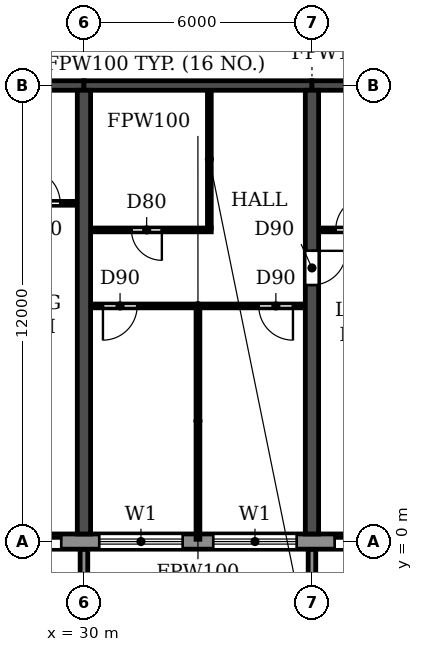
"""IFC4 building model, lengths in metres.
Left out: names, types, materials, properties, quantities, classifications, styles, units other than length and angle.
Written with IfcOpenShell. Run it as: python <this file> out.ifc"""

import sys

from ifc_helpers import new_model, si_unit, direction, frame, frame_2d, origin, place, context, subcontext, project, spatial, polyline, rectangle, outline, extrude, source, transform, mapped, element, fill, save


model = new_model("IFC4")
c1 = context("Model", 3, precision=1e-05, world=origin(), true_north=direction((0.0, 1.0)))
c2 = subcontext(c1, "Body", "Model", "MODEL_VIEW")
j1 = project(units=[si_unit("LENGTHUNIT", "METRE"), si_unit("PLANEANGLEUNIT", "RADIAN")], contexts=[c1])
p1 = place(None, origin())
s1 = spatial("IfcSite", under=j1, at=p1, CompositionType="ELEMENT")
p2 = place(p1, origin())
s2 = spatial("IfcBuilding", under=s1, at=p2, CompositionType="ELEMENT")
p3 = place(p2, frame((0.0, 0.0, 76.2)))
s3 = spatial("IfcBuildingStorey", under=s2, at=p3, CompositionType="ELEMENT", Elevation=76.2)
p4 = place(p3, frame((30.0, 0.2, 0.0), z_axis=(0.0, 0.0, 1.0), x_axis=(0.0, 1.0, 0.0)))
e1 = element("IfcWall", 1, at=p4, inside=s3, PredefinedType="SHEAR", context=c2, shape_type="SweptSolid", body=[
    extrude(rectangle(XDim=11.675, YDim=0.35, at=frame_2d((5.837, 0.0))), origin(), (0.0, 0.0, 1.0), 3.06),
])
p5 = place(p3, frame((36.0, 0.2, 0.0), z_axis=(0.0, 0.0, 1.0), x_axis=(0.0, 1.0, 0.0)))
e2 = element("IfcWall", 2, at=p5, inside=s3, PredefinedType="SHEAR", context=c2, shape_type="SweptSolid", body=[
    extrude(rectangle(XDim=11.675, YDim=0.35, at=frame_2d((5.837, 0.0))), origin(), (0.0, 0.0, 1.0), 3.06),
])
p6 = place(p5, frame((6.55, 0.0, 0.0)))
e3 = element("IfcOpeningElement", 3, at=p6, cuts=e2, PredefinedType="OPENING", context=c2, shape_type="SweptSolid", body=[
    extrude(rectangle(XDim=0.9, YDim=2.1, at=frame_2d((0.45, 1.05))), frame((0.0, 0.185, 0.0), z_axis=(0.0, -1.0, 0.0), x_axis=(1.0, 0.0, 0.0)), (0.0, 0.0, 1.0), 0.37),
])
p7 = place(p3, frame((24.0, 12.0, 0.0), z_axis=(0.0, 0.0, 1.0), x_axis=(1.0, 0.0, 0.0)))
e4 = element("IfcWall", 4, at=p7, inside=s3, PredefinedType="SHEAR", context=c2, shape_type="SweptSolid", body=[
    extrude(rectangle(XDim=6.0, YDim=0.25, at=frame_2d((3.0, 0.0))), origin(), (0.0, 0.0, 1.0), 2.46),
])
p8 = place(p7, frame((2.45, 0.0, 0.0)))
e5 = element("IfcOpeningElement", 5, at=p8, cuts=e4, PredefinedType="OPENING", context=c2, shape_type="SweptSolid", body=[
    extrude(rectangle(XDim=1.0, YDim=2.1, at=frame_2d((0.5, 1.05))), frame((0.0, 0.135, 0.0), z_axis=(0.0, -1.0, 0.0), x_axis=(1.0, 0.0, 0.0)), (0.0, 0.0, 1.0), 0.27),
])
p9 = place(p3, frame((30.0, 12.0, 0.0), z_axis=(0.0, 0.0, 1.0), x_axis=(1.0, 0.0, 0.0)))
e6 = element("IfcWall", 6, at=p9, inside=s3, PredefinedType="SHEAR", context=c2, shape_type="SweptSolid", body=[
    extrude(rectangle(XDim=6.0, YDim=0.25, at=frame_2d((3.0, 0.0))), origin(), (0.0, 0.0, 1.0), 2.46),
])
p10 = place(p3, frame((36.0, 12.0, 0.0), z_axis=(0.0, 0.0, 1.0), x_axis=(1.0, 0.0, 0.0)))
e7 = element("IfcWall", 7, at=p10, inside=s3, PredefinedType="SHEAR", context=c2, shape_type="SweptSolid", body=[
    extrude(rectangle(XDim=6.0, YDim=0.25, at=frame_2d((3.0, 0.0))), origin(), (0.0, 0.0, 1.0), 2.46),
])
p11 = place(p10, frame((2.55, 0.0, 0.0)))
e8 = element("IfcOpeningElement", 8, at=p11, cuts=e7, PredefinedType="OPENING", context=c2, shape_type="SweptSolid", body=[
    extrude(rectangle(XDim=1.0, YDim=2.1, at=frame_2d((0.5, 1.05))), frame((0.0, 0.135, 0.0), z_axis=(0.0, -1.0, 0.0), x_axis=(1.0, 0.0, 0.0)), (0.0, 0.0, 1.0), 0.27),
])
p12 = place(p3, frame((10.683, 0.0, 0.0), z_axis=(0.0, 0.0, 1.0), x_axis=(1.0, 0.0, 0.0)))
e9 = element("IfcWall", 9, at=p12, inside=s3, PredefinedType="STANDARD", context=c2, shape_type="SweptSolid", body=[
    extrude(rectangle(XDim=80.634, YDim=0.4, at=frame_2d((40.317, 0.0))), origin(), (0.0, 0.0, 1.0), 3.06),
])
p13 = place(p12, frame((1.717, 0.0, 0.9)))
e10 = element("IfcOpeningElement", 10, at=p13, cuts=e9, PredefinedType="OPENING", context=c2, shape_type="SweptSolid", body=[
    extrude(rectangle(XDim=2.2, YDim=1.5, at=frame_2d((1.1, 0.75))), frame((0.0, 0.21, 0.0), z_axis=(0.0, -1.0, 0.0), x_axis=(1.0, 0.0, 0.0)), (0.0, 0.0, 1.0), 0.42),
])
p14 = place(p12, frame((4.917, 0.0, 0.0)))
e11 = element("IfcOpeningElement", 11, at=p14, cuts=e9, PredefinedType="OPENING", context=c2, shape_type="SweptSolid", body=[
    extrude(rectangle(XDim=1.8, YDim=2.4, at=frame_2d((0.9, 1.2))), frame((0.0, 0.21, 0.0), z_axis=(0.0, -1.0, 0.0), x_axis=(1.0, 0.0, 0.0)), (0.0, 0.0, 1.0), 0.42),
])
p15 = place(p12, frame((7.717, 0.0, 0.9)))
e12 = element("IfcOpeningElement", 12, at=p15, cuts=e9, PredefinedType="OPENING", context=c2, shape_type="SweptSolid", body=[
    extrude(rectangle(XDim=2.2, YDim=1.5, at=frame_2d((1.1, 0.75))), frame((0.0, 0.21, 0.0), z_axis=(0.0, -1.0, 0.0), x_axis=(1.0, 0.0, 0.0)), (0.0, 0.0, 1.0), 0.42),
])
p16 = place(p12, frame((10.717, 0.0, 0.9)))
e13 = element("IfcOpeningElement", 13, at=p16, cuts=e9, PredefinedType="OPENING", context=c2, shape_type="SweptSolid", body=[
    extrude(rectangle(XDim=2.2, YDim=1.5, at=frame_2d((1.1, 0.75))), frame((0.0, 0.21, 0.0), z_axis=(0.0, -1.0, 0.0), x_axis=(1.0, 0.0, 0.0)), (0.0, 0.0, 1.0), 0.42),
])
p17 = place(p12, frame((13.717, 0.0, 0.9)))
e14 = element("IfcOpeningElement", 14, at=p17, cuts=e9, PredefinedType="OPENING", context=c2, shape_type="SweptSolid", body=[
    extrude(rectangle(XDim=2.2, YDim=1.5, at=frame_2d((1.1, 0.75))), frame((0.0, 0.21, 0.0), z_axis=(0.0, -1.0, 0.0), x_axis=(1.0, 0.0, 0.0)), (0.0, 0.0, 1.0), 0.42),
])
p18 = place(p12, frame((16.917, 0.0, 0.0)))
e15 = element("IfcOpeningElement", 15, at=p18, cuts=e9, PredefinedType="OPENING", context=c2, shape_type="SweptSolid", body=[
    extrude(rectangle(XDim=1.8, YDim=2.4, at=frame_2d((0.9, 1.2))), frame((0.0, 0.21, 0.0), z_axis=(0.0, -1.0, 0.0), x_axis=(1.0, 0.0, 0.0)), (0.0, 0.0, 1.0), 0.42),
])
p19 = place(p12, frame((19.717, 0.0, 0.9)))
e16 = element("IfcOpeningElement", 16, at=p19, cuts=e9, PredefinedType="OPENING", context=c2, shape_type="SweptSolid", body=[
    extrude(rectangle(XDim=2.2, YDim=1.5, at=frame_2d((1.1, 0.75))), frame((0.0, 0.21, 0.0), z_axis=(0.0, -1.0, 0.0), x_axis=(1.0, 0.0, 0.0)), (0.0, 0.0, 1.0), 0.42),
])
p20 = place(p12, frame((22.717, 0.0, 0.9)))
e17 = element("IfcOpeningElement", 17, at=p20, cuts=e9, PredefinedType="OPENING", context=c2, shape_type="SweptSolid", body=[
    extrude(rectangle(XDim=2.2, YDim=1.5, at=frame_2d((1.1, 0.75))), frame((0.0, 0.21, 0.0), z_axis=(0.0, -1.0, 0.0), x_axis=(1.0, 0.0, 0.0)), (0.0, 0.0, 1.0), 0.42),
])
p21 = place(p12, frame((25.917, 0.0, 0.0)))
e18 = element("IfcOpeningElement", 18, at=p21, cuts=e9, PredefinedType="OPENING", context=c2, shape_type="SweptSolid", body=[
    extrude(rectangle(XDim=1.8, YDim=2.4, at=frame_2d((0.9, 1.2))), frame((0.0, 0.21, 0.0), z_axis=(0.0, -1.0, 0.0), x_axis=(1.0, 0.0, 0.0)), (0.0, 0.0, 1.0), 0.42),
])
p22 = place(p12, frame((28.717, 0.0, 0.9)))
e19 = element("IfcOpeningElement", 19, at=p22, cuts=e9, PredefinedType="OPENING", context=c2, shape_type="SweptSolid", body=[
    extrude(rectangle(XDim=2.2, YDim=1.5, at=frame_2d((1.1, 0.75))), frame((0.0, 0.21, 0.0), z_axis=(0.0, -1.0, 0.0), x_axis=(1.0, 0.0, 0.0)), (0.0, 0.0, 1.0), 0.42),
])
p23 = place(p12, frame((31.717, 0.0, 0.9)))
e20 = element("IfcOpeningElement", 20, at=p23, cuts=e9, PredefinedType="OPENING", context=c2, shape_type="SweptSolid", body=[
    extrude(rectangle(XDim=2.2, YDim=1.5, at=frame_2d((1.1, 0.75))), frame((0.0, 0.21, 0.0), z_axis=(0.0, -1.0, 0.0), x_axis=(1.0, 0.0, 0.0)), (0.0, 0.0, 1.0), 0.42),
])
p24 = place(p12, frame((34.717, 0.0, 0.9)))
e21 = element("IfcOpeningElement", 21, at=p24, cuts=e9, PredefinedType="OPENING", context=c2, shape_type="SweptSolid", body=[
    extrude(rectangle(XDim=2.2, YDim=1.5, at=frame_2d((1.1, 0.75))), frame((0.0, 0.21, 0.0), z_axis=(0.0, -1.0, 0.0), x_axis=(1.0, 0.0, 0.0)), (0.0, 0.0, 1.0), 0.42),
])
p25 = place(p12, frame((37.917, 0.0, 0.0)))
e22 = element("IfcOpeningElement", 22, at=p25, cuts=e9, PredefinedType="OPENING", context=c2, shape_type="SweptSolid", body=[
    extrude(rectangle(XDim=1.8, YDim=2.4, at=frame_2d((0.9, 1.2))), frame((0.0, 0.21, 0.0), z_axis=(0.0, -1.0, 0.0), x_axis=(1.0, 0.0, 0.0)), (0.0, 0.0, 1.0), 0.42),
])
p26 = place(p12, frame((40.717, 0.0, 0.9)))
e23 = element("IfcOpeningElement", 23, at=p26, cuts=e9, PredefinedType="OPENING", context=c2, shape_type="SweptSolid", body=[
    extrude(rectangle(XDim=2.2, YDim=1.5, at=frame_2d((1.1, 0.75))), frame((0.0, 0.21, 0.0), z_axis=(0.0, -1.0, 0.0), x_axis=(1.0, 0.0, 0.0)), (0.0, 0.0, 1.0), 0.42),
])
p27 = place(p12, frame((43.717, 0.0, 0.9)))
e24 = element("IfcOpeningElement", 24, at=p27, cuts=e9, PredefinedType="OPENING", context=c2, shape_type="SweptSolid", body=[
    extrude(rectangle(XDim=2.2, YDim=1.5, at=frame_2d((1.1, 0.75))), frame((0.0, 0.21, 0.0), z_axis=(0.0, -1.0, 0.0), x_axis=(1.0, 0.0, 0.0)), (0.0, 0.0, 1.0), 0.42),
])
p28 = place(p12, frame((46.717, 0.0, 0.9)))
e25 = element("IfcOpeningElement", 25, at=p28, cuts=e9, PredefinedType="OPENING", context=c2, shape_type="SweptSolid", body=[
    extrude(rectangle(XDim=2.2, YDim=1.5, at=frame_2d((1.1, 0.75))), frame((0.0, 0.21, 0.0), z_axis=(0.0, -1.0, 0.0), x_axis=(1.0, 0.0, 0.0)), (0.0, 0.0, 1.0), 0.42),
])
p29 = place(p12, frame((49.917, 0.0, 0.0)))
e26 = element("IfcOpeningElement", 26, at=p29, cuts=e9, PredefinedType="OPENING", context=c2, shape_type="SweptSolid", body=[
    extrude(rectangle(XDim=1.8, YDim=2.4, at=frame_2d((0.9, 1.2))), frame((0.0, 0.21, 0.0), z_axis=(0.0, -1.0, 0.0), x_axis=(1.0, 0.0, 0.0)), (0.0, 0.0, 1.0), 0.42),
])
p30 = place(p12, frame((52.717, 0.0, 0.9)))
e27 = element("IfcOpeningElement", 27, at=p30, cuts=e9, PredefinedType="OPENING", context=c2, shape_type="SweptSolid", body=[
    extrude(rectangle(XDim=2.2, YDim=1.5, at=frame_2d((1.1, 0.75))), frame((0.0, 0.21, 0.0), z_axis=(0.0, -1.0, 0.0), x_axis=(1.0, 0.0, 0.0)), (0.0, 0.0, 1.0), 0.42),
])
p31 = place(p12, frame((55.717, 0.0, 0.9)))
e28 = element("IfcOpeningElement", 28, at=p31, cuts=e9, PredefinedType="OPENING", context=c2, shape_type="SweptSolid", body=[
    extrude(rectangle(XDim=2.2, YDim=1.5, at=frame_2d((1.1, 0.75))), frame((0.0, 0.21, 0.0), z_axis=(0.0, -1.0, 0.0), x_axis=(1.0, 0.0, 0.0)), (0.0, 0.0, 1.0), 0.42),
])
p32 = place(p12, frame((58.717, 0.0, 0.9)))
e29 = element("IfcOpeningElement", 29, at=p32, cuts=e9, PredefinedType="OPENING", context=c2, shape_type="SweptSolid", body=[
    extrude(rectangle(XDim=2.2, YDim=1.5, at=frame_2d((1.1, 0.75))), frame((0.0, 0.21, 0.0), z_axis=(0.0, -1.0, 0.0), x_axis=(1.0, 0.0, 0.0)), (0.0, 0.0, 1.0), 0.42),
])
p33 = place(p12, frame((61.717, 0.0, 0.9)))
e30 = element("IfcOpeningElement", 30, at=p33, cuts=e9, PredefinedType="OPENING", context=c2, shape_type="SweptSolid", body=[
    extrude(rectangle(XDim=2.2, YDim=1.5, at=frame_2d((1.1, 0.75))), frame((0.0, 0.21, 0.0), z_axis=(0.0, -1.0, 0.0), x_axis=(1.0, 0.0, 0.0)), (0.0, 0.0, 1.0), 0.42),
])
p34 = place(p12, frame((64.917, 0.0, 0.0)))
e31 = element("IfcOpeningElement", 31, at=p34, cuts=e9, PredefinedType="OPENING", context=c2, shape_type="SweptSolid", body=[
    extrude(rectangle(XDim=1.8, YDim=2.4, at=frame_2d((0.9, 1.2))), frame((0.0, 0.21, 0.0), z_axis=(0.0, -1.0, 0.0), x_axis=(1.0, 0.0, 0.0)), (0.0, 0.0, 1.0), 0.42),
])
p35 = place(p12, frame((67.717, 0.0, 0.9)))
e32 = element("IfcOpeningElement", 32, at=p35, cuts=e9, PredefinedType="OPENING", context=c2, shape_type="SweptSolid", body=[
    extrude(rectangle(XDim=2.2, YDim=1.5, at=frame_2d((1.1, 0.75))), frame((0.0, 0.21, 0.0), z_axis=(0.0, -1.0, 0.0), x_axis=(1.0, 0.0, 0.0)), (0.0, 0.0, 1.0), 0.42),
])
p36 = place(p12, frame((70.717, 0.0, 0.9)))
e33 = element("IfcOpeningElement", 33, at=p36, cuts=e9, PredefinedType="OPENING", context=c2, shape_type="SweptSolid", body=[
    extrude(rectangle(XDim=2.2, YDim=1.5, at=frame_2d((1.1, 0.75))), frame((0.0, 0.21, 0.0), z_axis=(0.0, -1.0, 0.0), x_axis=(1.0, 0.0, 0.0)), (0.0, 0.0, 1.0), 0.42),
])
p37 = place(p12, frame((73.917, 0.0, 0.0)))
e34 = element("IfcOpeningElement", 34, at=p37, cuts=e9, PredefinedType="OPENING", context=c2, shape_type="SweptSolid", body=[
    extrude(rectangle(XDim=1.8, YDim=2.4, at=frame_2d((0.9, 1.2))), frame((0.0, 0.21, 0.0), z_axis=(0.0, -1.0, 0.0), x_axis=(1.0, 0.0, 0.0)), (0.0, 0.0, 1.0), 0.42),
])
p38 = place(p12, frame((76.717, 0.0, 0.9)))
e35 = element("IfcOpeningElement", 35, at=p38, cuts=e9, PredefinedType="OPENING", context=c2, shape_type="SweptSolid", body=[
    extrude(rectangle(XDim=2.2, YDim=1.5, at=frame_2d((1.1, 0.75))), frame((0.0, 0.21, 0.0), z_axis=(0.0, -1.0, 0.0), x_axis=(1.0, 0.0, 0.0)), (0.0, 0.0, 1.0), 0.42),
])
m1 = source(origin(), c2, "Body", "SweptSolid", [
    extrude(outline(polyline([(0.0, 0.0), (0.2, 0.0), (0.2, 1.65), (0.0, 1.65), (0.0, 0.0)])), origin(), (0.0, 0.0, 1.0), 3.1),
])
for number, where in (
    (36, (29.9, -1.85, 0.0)),
    (37, (35.9, -1.85, 0.0)),
):
    element("IfcWall", number, at=place(p3, frame(where)), inside=s3, PredefinedType="STANDARD", context=c2, shape_type="MappedRepresentation", body=[
        mapped(m1, transform((0.0, 0.0, 0.0))),
    ])
p39 = place(p3, frame((30.185, 6.2, 0.0), z_axis=(0.0, 0.0, 1.0), x_axis=(1.0, 0.0, 0.0)))
e38 = element("IfcWall", 38, at=p39, inside=s3, PredefinedType="PARTITIONING", context=c2, shape_type="SweptSolid", body=[
    extrude(rectangle(XDim=5.63, YDim=0.1, at=frame_2d((2.815, 0.0))), origin(), (0.0, 0.0, 1.0), 3.06),
])
p40 = place(p39, frame((0.315, 0.0, 0.0)))
e39 = element("IfcOpeningElement", 39, at=p40, cuts=e38, PredefinedType="OPENING", context=c2, shape_type="SweptSolid", body=[
    extrude(rectangle(XDim=0.9, YDim=2.1, at=frame_2d((0.45, 1.05))), frame((0.0, 0.06, 0.0), z_axis=(0.0, -1.0, 0.0), x_axis=(1.0, 0.0, 0.0)), (0.0, 0.0, 1.0), 0.12),
])
p41 = place(p39, frame((4.415, 0.0, 0.0)))
e40 = element("IfcOpeningElement", 40, at=p41, cuts=e38, PredefinedType="OPENING", context=c2, shape_type="SweptSolid", body=[
    extrude(rectangle(XDim=0.9, YDim=2.1, at=frame_2d((0.45, 1.05))), frame((0.0, 0.06, 0.0), z_axis=(0.0, -1.0, 0.0), x_axis=(1.0, 0.0, 0.0)), (0.0, 0.0, 1.0), 0.12),
])
p42 = place(p3, frame((30.185, 8.2, 0.0), z_axis=(0.0, 0.0, 1.0), x_axis=(1.0, 0.0, 0.0)))
e41 = element("IfcWall", 41, at=p42, inside=s3, PredefinedType="PARTITIONING", context=c2, shape_type="SweptSolid", body=[
    extrude(rectangle(XDim=3.165, YDim=0.1, at=frame_2d((1.583, 0.0))), origin(), (0.0, 0.0, 1.0), 3.06),
])
p43 = place(p42, frame((1.065, 0.0, 0.0)))
e42 = element("IfcOpeningElement", 42, at=p43, cuts=e41, PredefinedType="OPENING", context=c2, shape_type="SweptSolid", body=[
    extrude(rectangle(XDim=0.8, YDim=2.1, at=frame_2d((0.4, 1.05))), frame((0.0, 0.06, 0.0), z_axis=(0.0, -1.0, 0.0), x_axis=(1.0, 0.0, 0.0)), (0.0, 0.0, 1.0), 0.12),
])
p44 = place(p3, frame((36.185, 8.2, 0.0), z_axis=(0.0, 0.0, 1.0), x_axis=(1.0, 0.0, 0.0)))
e43 = element("IfcWall", 43, at=p44, inside=s3, PredefinedType="PARTITIONING", context=c2, shape_type="SweptSolid", body=[
    extrude(rectangle(XDim=2.015, YDim=0.1, at=frame_2d((1.007, 0.0))), origin(), (0.0, 0.0, 1.0), 3.06),
])
p45 = place(p44, frame((0.44, 0.0, 0.0)))
e44 = element("IfcOpeningElement", 44, at=p45, cuts=e43, PredefinedType="OPENING", context=c2, shape_type="SweptSolid", body=[
    extrude(rectangle(XDim=0.9, YDim=2.1, at=frame_2d((0.45, 1.05))), frame((0.0, 0.06, 0.0), z_axis=(0.0, -1.0, 0.0), x_axis=(1.0, 0.0, 0.0)), (0.0, 0.0, 1.0), 0.12),
])
p46 = place(p3, frame((27.8, 8.9, 0.0), z_axis=(0.0, 0.0, 1.0), x_axis=(1.0, 0.0, 0.0)))
e45 = element("IfcWall", 45, at=p46, inside=s3, PredefinedType="PARTITIONING", context=c2, shape_type="SweptSolid", body=[
    extrude(rectangle(XDim=2.015, YDim=0.1, at=frame_2d((1.007, 0.0))), origin(), (0.0, 0.0, 1.0), 3.06),
])
p47 = place(p46, frame((0.675, 0.0, 0.0)))
e46 = element("IfcOpeningElement", 46, at=p47, cuts=e45, PredefinedType="OPENING", context=c2, shape_type="SweptSolid", body=[
    extrude(rectangle(XDim=0.9, YDim=2.1, at=frame_2d((0.45, 1.05))), frame((0.0, 0.06, 0.0), z_axis=(0.0, -1.0, 0.0), x_axis=(1.0, 0.0, 0.0)), (0.0, 0.0, 1.0), 0.12),
])
p48 = place(p3, frame((33.0, 0.06, 0.0), z_axis=(0.0, 0.0, 1.0), x_axis=(0.0, 1.0, 0.0)))
e47 = element("IfcWall", 47, at=p48, inside=s3, PredefinedType="PARTITIONING", context=c2, shape_type="SweptSolid", body=[
    extrude(rectangle(XDim=6.09, YDim=0.1, at=frame_2d((3.045, 0.0))), origin(), (0.0, 0.0, 1.0), 3.06),
])
p49 = place(p3, frame((33.3, 8.25, 0.0), z_axis=(0.0, 0.0, 1.0), x_axis=(0.0, 1.0, 0.0)))
e48 = element("IfcWall", 48, at=p49, inside=s3, PredefinedType="PARTITIONING", context=c2, shape_type="SweptSolid", body=[
    extrude(rectangle(XDim=3.615, YDim=0.1, at=frame_2d((1.808, 0.0))), origin(), (0.0, 0.0, 1.0), 3.06),
])
p50 = place(p18, origin())
e49 = element("IfcDoor", 49, at=p50, inside=s3, OperationType="DOUBLE_DOOR_SLIDING", PredefinedType="DOOR", context=c2, shape_type="SweptSolid", body=[
    extrude(rectangle(XDim=1.8, YDim=2.4, at=frame_2d((0.9, 1.2))), frame((0.0, 0.025, 0.0), z_axis=(0.0, -1.0, 0.0), x_axis=(1.0, 0.0, 0.0)), (0.0, 0.0, 1.0), 0.05),
])
fill(e15, e49)
p51 = place(p19, origin())
e50 = element("IfcWindow", 50, at=p51, inside=s3, PartitioningType="DOUBLE_PANEL_HORIZONTAL", PredefinedType="WINDOW", context=c2, shape_type="SweptSolid", body=[
    extrude(rectangle(XDim=2.2, YDim=1.5, at=frame_2d((1.1, 0.75))), frame((0.0, 0.03, 0.0), z_axis=(0.0, -1.0, 0.0), x_axis=(1.0, 0.0, 0.0)), (0.0, 0.0, 1.0), 0.06),
])
fill(e16, e50)
p52 = place(p20, origin())
e51 = element("IfcWindow", 51, at=p52, inside=s3, PartitioningType="DOUBLE_PANEL_HORIZONTAL", PredefinedType="WINDOW", context=c2, shape_type="SweptSolid", body=[
    extrude(rectangle(XDim=2.2, YDim=1.5, at=frame_2d((1.1, 0.75))), frame((0.0, 0.03, 0.0), z_axis=(0.0, -1.0, 0.0), x_axis=(1.0, 0.0, 0.0)), (0.0, 0.0, 1.0), 0.06),
])
fill(e17, e51)
p53 = place(p21, origin())
e52 = element("IfcDoor", 52, at=p53, inside=s3, OperationType="DOUBLE_DOOR_SLIDING", PredefinedType="DOOR", context=c2, shape_type="SweptSolid", body=[
    extrude(rectangle(XDim=1.8, YDim=2.4, at=frame_2d((0.9, 1.2))), frame((0.0, 0.025, 0.0), z_axis=(0.0, -1.0, 0.0), x_axis=(1.0, 0.0, 0.0)), (0.0, 0.0, 1.0), 0.05),
])
fill(e18, e52)
p54 = place(p47, origin())
e53 = element("IfcDoor", 53, at=p54, inside=s3, OperationType="SINGLE_SWING_LEFT", PredefinedType="DOOR", context=c2, shape_type="SweptSolid", body=[
    extrude(rectangle(XDim=0.9, YDim=2.1, at=frame_2d((0.45, 1.05))), frame((0.0, 0.025, 0.0), z_axis=(0.0, -1.0, 0.0), x_axis=(1.0, 0.0, 0.0)), (0.0, 0.0, 1.0), 0.05),
])
fill(e46, e53)
p55 = place(p40, frame((0.9, 0.0, 0.0), z_axis=(0.0, 0.0, 1.0), x_axis=(-1.0, 0.0, 0.0)))
e54 = element("IfcDoor", 54, at=p55, inside=s3, OperationType="SINGLE_SWING_RIGHT", PredefinedType="DOOR", context=c2, shape_type="SweptSolid", body=[
    extrude(rectangle(XDim=0.9, YDim=2.1, at=frame_2d((0.45, 1.05))), frame((0.0, 0.025, 0.0), z_axis=(0.0, -1.0, 0.0), x_axis=(1.0, 0.0, 0.0)), (0.0, 0.0, 1.0), 0.05),
])
fill(e39, e54)
p56 = place(p43, frame((0.8, 0.0, 0.0), z_axis=(0.0, 0.0, 1.0), x_axis=(-1.0, 0.0, 0.0)))
e55 = element("IfcDoor", 55, at=p56, inside=s3, OperationType="SINGLE_SWING_LEFT", PredefinedType="DOOR", context=c2, shape_type="SweptSolid", body=[
    extrude(rectangle(XDim=0.8, YDim=2.1, at=frame_2d((0.4, 1.05))), frame((0.0, 0.025, 0.0), z_axis=(0.0, -1.0, 0.0), x_axis=(1.0, 0.0, 0.0)), (0.0, 0.0, 1.0), 0.05),
])
fill(e42, e55)
p57 = place(p41, frame((0.9, 0.0, 0.0), z_axis=(0.0, 0.0, 1.0), x_axis=(-1.0, 0.0, 0.0)))
e56 = element("IfcDoor", 56, at=p57, inside=s3, OperationType="SINGLE_SWING_LEFT", PredefinedType="DOOR", context=c2, shape_type="SweptSolid", body=[
    extrude(rectangle(XDim=0.9, YDim=2.1, at=frame_2d((0.45, 1.05))), frame((0.0, 0.025, 0.0), z_axis=(0.0, -1.0, 0.0), x_axis=(1.0, 0.0, 0.0)), (0.0, 0.0, 1.0), 0.05),
])
fill(e40, e56)
p58 = place(p6, frame((0.9, 0.0, 0.0), z_axis=(0.0, 0.0, 1.0), x_axis=(-1.0, 0.0, 0.0)))
e57 = element("IfcDoor", 57, at=p58, inside=s3, OperationType="SINGLE_SWING_LEFT", PredefinedType="DOOR", context=c2, shape_type="SweptSolid", body=[
    extrude(rectangle(XDim=0.9, YDim=2.1, at=frame_2d((0.45, 1.05))), frame((0.0, 0.025, 0.0), z_axis=(0.0, -1.0, 0.0), x_axis=(1.0, 0.0, 0.0)), (0.0, 0.0, 1.0), 0.05),
])
fill(e3, e57)
p59 = place(p45, origin())
e58 = element("IfcDoor", 58, at=p59, inside=s3, OperationType="SINGLE_SWING_RIGHT", PredefinedType="DOOR", context=c2, shape_type="SweptSolid", body=[
    extrude(rectangle(XDim=0.9, YDim=2.1, at=frame_2d((0.45, 1.05))), frame((0.0, 0.025, 0.0), z_axis=(0.0, -1.0, 0.0), x_axis=(1.0, 0.0, 0.0)), (0.0, 0.0, 1.0), 0.05),
])
fill(e44, e58)
save(model, sys.argv[1])
